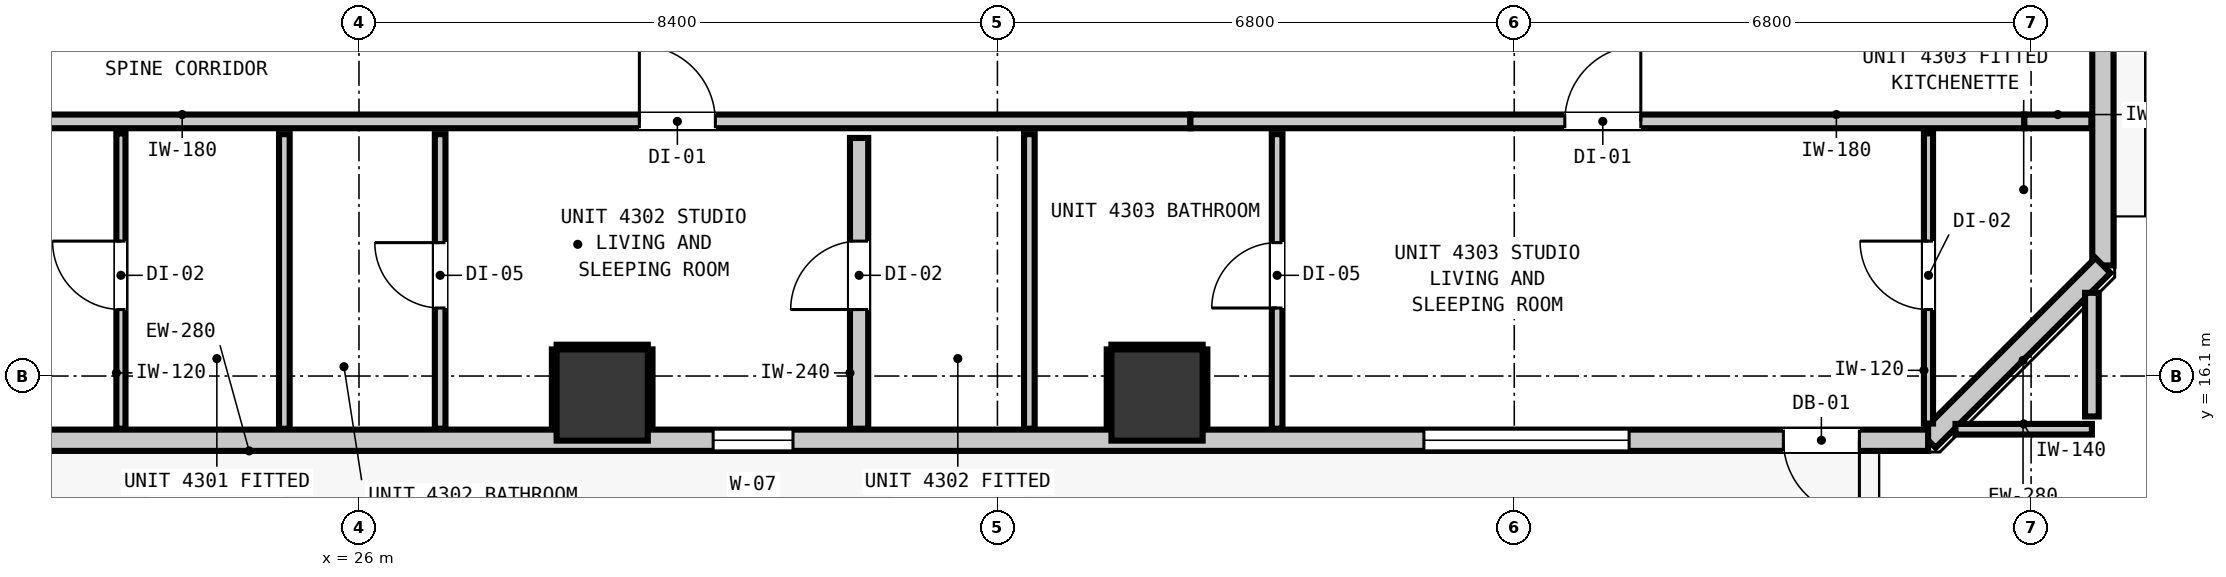
"""IFC4 building model, lengths in metres.
Left out: names, types, materials, properties, quantities, classifications, styles, units other than length and angle.
Written with IfcOpenShell. Run it as: python <this file> out.ifc"""

import sys

from ifc_helpers import new_model, si_unit, direction, frame, frame_2d, origin, origin_2d, place, context, subcontext, project, spatial, rectangle, extrude, element, fill, save


model = new_model("IFC4")
c1 = context("Model", 3, precision=1e-05, world=origin(), true_north=direction((0.0, 1.0)))
c2 = subcontext(c1, "Body", "Model", "MODEL_VIEW")
j1 = project(units=[si_unit("LENGTHUNIT", "METRE"), si_unit("PLANEANGLEUNIT", "RADIAN")], contexts=[c1])
p1 = place(None, origin())
s1 = spatial("IfcSite", under=j1, at=p1, CompositionType="ELEMENT")
p2 = place(p1, origin())
s2 = spatial("IfcBuilding", under=s1, at=p2, CompositionType="ELEMENT")
p3 = place(p2, frame((0.0, 0.0, 149.24)))
s3 = spatial("IfcBuildingStorey", under=s2, at=p3, CompositionType="ELEMENT", Elevation=149.24)
for number, where, z_axis, x_axis in (
    (1, (29.2, 15.85, 0.0), (0.0, 0.0, 1.0), (1.0, 0.0, 0.0)),
    (2, (36.5, 15.85, 0.0), (0.0, 0.0, 1.0), (1.0, 0.0, 0.0)),
):
    element("IfcColumn", number, at=place(p3, frame(where, z_axis=z_axis, x_axis=x_axis)), inside=s3, PredefinedType="COLUMN", context=c2, shape_type="SweptSolid", body=[
        extrude(rectangle(XDim=1.2, YDim=1.2, at=origin_2d()), origin(), (0.0, 0.0, 1.0), 3.32),
    ])
p4 = place(p3, frame((48.945, 49.845, 0.0), z_axis=(0.0, 0.0, 1.0), x_axis=(0.0, -1.0, 0.0)))
e3 = element("IfcWall", 3, at=p4, inside=s3, PredefinedType="STANDARD", context=c2, shape_type="SweptSolid", body=[
    extrude(rectangle(XDim=32.29, YDim=0.28, at=frame_2d((16.145, 0.0))), origin(), (0.0, 0.0, 1.0), 3.08),
])
p5 = place(p4, frame((0.904, 0.0, 0.0)))
e4 = element("IfcOpeningElement", 4, at=p5, cuts=e3, PredefinedType="OPENING", context=c2, shape_type="SweptSolid", body=[
    extrude(rectangle(XDim=1.0, YDim=2.15, at=frame_2d((0.5, 1.075))), frame((0.0, 0.15, 0.0), z_axis=(0.0, -1.0, 0.0), x_axis=(1.0, 0.0, 0.0)), (0.0, 0.0, 1.0), 0.3),
])
p6 = place(p4, frame((3.074, 0.0, 0.85)))
e5 = element("IfcOpeningElement", 5, at=p6, cuts=e3, PredefinedType="OPENING", context=c2, shape_type="SweptSolid", body=[
    extrude(rectangle(XDim=1.05, YDim=1.65, at=frame_2d((0.525, 0.825))), frame((0.0, 0.15, 0.0), z_axis=(0.0, -1.0, 0.0), x_axis=(1.0, 0.0, 0.0)), (0.0, 0.0, 1.0), 0.3),
])
p7 = place(p4, frame((23.057, 0.0, 0.85)))
e6 = element("IfcOpeningElement", 6, at=p7, cuts=e3, PredefinedType="OPENING", context=c2, shape_type="SweptSolid", body=[
    extrude(rectangle(XDim=2.7, YDim=2.0, at=frame_2d((1.35, 1.0))), frame((0.0, 0.15, 0.0), z_axis=(0.0, -1.0, 0.0), x_axis=(1.0, 0.0, 0.0)), (0.0, 0.0, 1.0), 0.3),
])
p8 = place(p4, frame((20.733, 0.0, 0.85)))
e7 = element("IfcOpeningElement", 7, at=p8, cuts=e3, PredefinedType="OPENING", context=c2, shape_type="SweptSolid", body=[
    extrude(rectangle(XDim=1.05, YDim=1.65, at=frame_2d((0.525, 0.825))), frame((0.0, 0.15, 0.0), z_axis=(0.0, -1.0, 0.0), x_axis=(1.0, 0.0, 0.0)), (0.0, 0.0, 1.0), 0.3),
])
p9 = place(p4, frame((13.523, 0.0, 0.85)))
e8 = element("IfcOpeningElement", 8, at=p9, cuts=e3, PredefinedType="OPENING", context=c2, shape_type="SweptSolid", body=[
    extrude(rectangle(XDim=2.7, YDim=2.0, at=frame_2d((1.35, 1.0))), frame((0.0, 0.15, 0.0), z_axis=(0.0, -1.0, 0.0), x_axis=(1.0, 0.0, 0.0)), (0.0, 0.0, 1.0), 0.3),
])
p10 = place(p4, frame((11.247, 0.0, 0.85)))
e9 = element("IfcOpeningElement", 9, at=p10, cuts=e3, PredefinedType="OPENING", context=c2, shape_type="SweptSolid", body=[
    extrude(rectangle(XDim=1.05, YDim=1.65, at=frame_2d((0.525, 0.825))), frame((0.0, 0.15, 0.0), z_axis=(0.0, -1.0, 0.0), x_axis=(1.0, 0.0, 0.0)), (0.0, 0.0, 1.0), 0.3),
])
p11 = place(p3, frame((48.945, 17.555, 0.0), z_axis=(0.0, 0.0, 1.0), x_axis=(-0.707106781187, -0.707106781187, 0.0)))
e10 = element("IfcWall", 10, at=p11, inside=s3, PredefinedType="STANDARD", context=c2, shape_type="SweptSolid", body=[
    extrude(rectangle(XDim=3.253, YDim=0.28, at=frame_2d((1.626, 0.0))), origin(), (0.0, 0.0, 1.0), 3.08),
])
p12 = place(p3, frame((46.645, 15.255, 0.0), z_axis=(0.0, 0.0, 1.0), x_axis=(-1.0, 0.0, 0.0)))
e11 = element("IfcWall", 11, at=p12, inside=s3, PredefinedType="STANDARD", context=c2, shape_type="SweptSolid", body=[
    extrude(rectangle(XDim=35.09, YDim=0.28, at=frame_2d((17.545, 0.0))), origin(), (0.0, 0.0, 1.0), 3.08),
])
p13 = place(p12, frame((0.904, 0.0, 0.0)))
e12 = element("IfcOpeningElement", 12, at=p13, cuts=e11, PredefinedType="OPENING", context=c2, shape_type="SweptSolid", body=[
    extrude(rectangle(XDim=1.0, YDim=2.15, at=frame_2d((0.5, 1.075))), frame((0.0, 0.15, 0.0), z_axis=(0.0, -1.0, 0.0), x_axis=(1.0, 0.0, 0.0)), (0.0, 0.0, 1.0), 0.3),
])
p14 = place(p12, frame((28.195, 0.0, 0.85)))
e13 = element("IfcOpeningElement", 13, at=p14, cuts=e11, PredefinedType="OPENING", context=c2, shape_type="SweptSolid", body=[
    extrude(rectangle(XDim=2.7, YDim=2.0, at=frame_2d((1.35, 1.0))), frame((0.0, 0.15, 0.0), z_axis=(0.0, -1.0, 0.0), x_axis=(1.0, 0.0, 0.0)), (0.0, 0.0, 1.0), 0.3),
])
p15 = place(p12, frame((14.935, 0.0, 0.85)))
e14 = element("IfcOpeningElement", 14, at=p15, cuts=e11, PredefinedType="OPENING", context=c2, shape_type="SweptSolid", body=[
    extrude(rectangle(XDim=1.05, YDim=1.65, at=frame_2d((0.525, 0.825))), frame((0.0, 0.15, 0.0), z_axis=(0.0, -1.0, 0.0), x_axis=(1.0, 0.0, 0.0)), (0.0, 0.0, 1.0), 0.3),
])
p16 = place(p12, frame((3.934, 0.0, 0.85)))
e15 = element("IfcOpeningElement", 15, at=p16, cuts=e11, PredefinedType="OPENING", context=c2, shape_type="SweptSolid", body=[
    extrude(rectangle(XDim=2.7, YDim=2.0, at=frame_2d((1.35, 1.0))), frame((0.0, 0.15, 0.0), z_axis=(0.0, -1.0, 0.0), x_axis=(1.0, 0.0, 0.0)), (0.0, 0.0, 1.0), 0.3),
])
p17 = place(p3, frame((9.407, 19.45, 0.0), z_axis=(0.0, 0.0, 1.0), x_axis=(1.0, 0.0, 0.0)))
e16 = element("IfcWall", 16, at=p17, inside=s3, PredefinedType="PARTITIONING", context=c2, shape_type="SweptSolid", body=[
    extrude(rectangle(XDim=27.532, YDim=0.18, at=frame_2d((13.766, 0.0))), origin(), (0.0, 0.0, 1.0), 3.08),
])
p18 = place(p17, frame((7.252, 0.0, 0.0)))
e17 = element("IfcOpeningElement", 17, at=p18, cuts=e16, PredefinedType="OPENING", context=c2, shape_type="SweptSolid", body=[
    extrude(rectangle(XDim=1.0, YDim=2.15, at=frame_2d((0.5, 1.075))), frame((0.0, 0.1, 0.0), z_axis=(0.0, -1.0, 0.0), x_axis=(1.0, 0.0, 0.0)), (0.0, 0.0, 1.0), 0.2),
])
p19 = place(p17, frame((20.282, 0.0, 0.0)))
e18 = element("IfcOpeningElement", 18, at=p19, cuts=e16, PredefinedType="OPENING", context=c2, shape_type="SweptSolid", body=[
    extrude(rectangle(XDim=1.0, YDim=2.15, at=frame_2d((0.5, 1.075))), frame((0.0, 0.1, 0.0), z_axis=(0.0, -1.0, 0.0), x_axis=(1.0, 0.0, 0.0)), (0.0, 0.0, 1.0), 0.2),
])
p20 = place(p3, frame((36.939, 19.45, 0.0), z_axis=(0.0, 0.0, 1.0), x_axis=(1.0, 0.0, 0.0)))
e19 = element("IfcWall", 19, at=p20, inside=s3, PredefinedType="PARTITIONING", context=c2, shape_type="SweptSolid", body=[
    extrude(rectangle(XDim=10.972, YDim=0.18, at=frame_2d((5.486, 0.0))), origin(), (0.0, 0.0, 1.0), 2.565),
])
p21 = place(p20, frame((4.926, 0.0, 0.0)))
e20 = element("IfcOpeningElement", 20, at=p21, cuts=e19, PredefinedType="OPENING", context=c2, shape_type="SweptSolid", body=[
    extrude(rectangle(XDim=1.0, YDim=2.15, at=frame_2d((0.5, 1.075))), frame((0.0, 0.1, 0.0), z_axis=(0.0, -1.0, 0.0), x_axis=(1.0, 0.0, 0.0)), (0.0, 0.0, 1.0), 0.2),
])
p22 = place(p3, frame((47.911, 19.45, 0.0), z_axis=(0.0, 0.0, 1.0), x_axis=(1.0, 0.0, 0.0)))
e21 = element("IfcWall", 21, at=p22, inside=s3, PredefinedType="PARTITIONING", context=c2, shape_type="SweptSolid", body=[
    extrude(rectangle(XDim=0.882, YDim=0.18, at=frame_2d((0.441, 0.0))), origin(), (0.0, 0.0, 1.0), 3.08),
])
p23 = place(p3, frame((47.005, 15.4, 0.0), z_axis=(0.0, 0.0, 1.0), x_axis=(1.0, 0.0, 0.0)))
e22 = element("IfcWall", 22, at=p23, inside=s3, PredefinedType="PARTITIONING", context=c2, shape_type="SweptSolid", body=[
    extrude(rectangle(XDim=1.795, YDim=0.14, at=frame_2d((0.897, 0.0))), origin(), (0.0, 0.0, 1.0), 3.08),
])
p24 = place(p3, frame((32.58, 15.407, 0.0), z_axis=(0.0, 0.0, 1.0), x_axis=(0.0, 1.0, 0.0)))
e23 = element("IfcWall", 23, at=p24, inside=s3, PredefinedType="PARTITIONING", context=c2, shape_type="SweptSolid", body=[
    extrude(rectangle(XDim=3.825, YDim=0.24, at=frame_2d((1.913, 0.0))), origin(), (0.0, 0.0, 1.0), 3.08),
])
p25 = place(p24, frame((1.568, 0.0, 0.0)))
e24 = element("IfcOpeningElement", 24, at=p25, cuts=e23, PredefinedType="OPENING", context=c2, shape_type="SweptSolid", body=[
    extrude(rectangle(XDim=0.9, YDim=2.1, at=frame_2d((0.45, 1.05))), frame((0.0, 0.13, 0.0), z_axis=(0.0, -1.0, 0.0), x_axis=(1.0, 0.0, 0.0)), (0.0, 0.0, 1.0), 0.26),
])
p26 = place(p3, frame((48.8, 15.568, 0.0), z_axis=(0.0, 0.0, 1.0), x_axis=(0.0, 1.0, 0.0)))
e25 = element("IfcWall", 25, at=p26, inside=s3, PredefinedType="PARTITIONING", context=c2, shape_type="SweptSolid", body=[
    extrude(rectangle(XDim=1.627, YDim=0.18, at=frame_2d((0.813, 0.0))), origin(), (0.0, 0.0, 1.0), 3.08),
])
p27 = place(p3, frame((25.018, 15.407, 0.0), z_axis=(0.0, 0.0, 1.0), x_axis=(0.0, 1.0, 0.0)))
e26 = element("IfcWall", 26, at=p27, inside=s3, PredefinedType="PARTITIONING", context=c2, shape_type="SweptSolid", body=[
    extrude(rectangle(XDim=3.875, YDim=0.14, at=frame_2d((1.938, 0.0))), origin(), (0.0, 0.0, 1.0), 3.08),
])
p28 = place(p3, frame((27.068, 15.407, 0.0), z_axis=(0.0, 0.0, 1.0), x_axis=(0.0, 1.0, 0.0)))
e27 = element("IfcWall", 27, at=p28, inside=s3, PredefinedType="PARTITIONING", context=c2, shape_type="SweptSolid", body=[
    extrude(rectangle(XDim=3.875, YDim=0.14, at=frame_2d((1.938, 0.0))), origin(), (0.0, 0.0, 1.0), 3.08),
])
p29 = place(p28, frame((1.588, 0.0, 0.0)))
e28 = element("IfcOpeningElement", 28, at=p29, cuts=e27, PredefinedType="OPENING", context=c2, shape_type="SweptSolid", body=[
    extrude(rectangle(XDim=0.86, YDim=2.02, at=frame_2d((0.43, 1.01))), frame((0.0, 0.08, 0.0), z_axis=(0.0, -1.0, 0.0), x_axis=(1.0, 0.0, 0.0)), (0.0, 0.0, 1.0), 0.16),
])
p30 = place(p3, frame((34.82, 15.407, 0.0), z_axis=(0.0, 0.0, 1.0), x_axis=(0.0, 1.0, 0.0)))
e29 = element("IfcWall", 29, at=p30, inside=s3, PredefinedType="PARTITIONING", context=c2, shape_type="SweptSolid", body=[
    extrude(rectangle(XDim=3.875, YDim=0.14, at=frame_2d((1.938, 0.0))), origin(), (0.0, 0.0, 1.0), 3.08),
])
p31 = place(p3, frame((38.08, 15.407, 0.0), z_axis=(0.0, 0.0, 1.0), x_axis=(0.0, 1.0, 0.0)))
e30 = element("IfcWall", 30, at=p31, inside=s3, PredefinedType="PARTITIONING", context=c2, shape_type="SweptSolid", body=[
    extrude(rectangle(XDim=3.875, YDim=0.14, at=frame_2d((1.938, 0.0))), origin(), (0.0, 0.0, 1.0), 3.08),
])
p32 = place(p31, frame((1.588, 0.0, 0.0)))
e31 = element("IfcOpeningElement", 31, at=p32, cuts=e30, PredefinedType="OPENING", context=c2, shape_type="SweptSolid", body=[
    extrude(rectangle(XDim=0.86, YDim=2.02, at=frame_2d((0.43, 1.01))), frame((0.0, 0.08, 0.0), z_axis=(0.0, -1.0, 0.0), x_axis=(1.0, 0.0, 0.0)), (0.0, 0.0, 1.0), 0.16),
])
p33 = place(p3, frame((22.868, 15.407, 0.0), z_axis=(0.0, 0.0, 1.0), x_axis=(0.0, 1.0, 0.0)))
e32 = element("IfcWall", 32, at=p33, inside=s3, PredefinedType="PARTITIONING", context=c2, shape_type="SweptSolid", body=[
    extrude(rectangle(XDim=3.885, YDim=0.12, at=frame_2d((1.942, 0.0))), origin(), (0.0, 0.0, 1.0), 3.08),
])
p34 = place(p33, frame((1.568, 0.0, 0.0)))
e33 = element("IfcOpeningElement", 33, at=p34, cuts=e32, PredefinedType="OPENING", context=c2, shape_type="SweptSolid", body=[
    extrude(rectangle(XDim=0.9, YDim=2.1, at=frame_2d((0.45, 1.05))), frame((0.0, 0.07, 0.0), z_axis=(0.0, -1.0, 0.0), x_axis=(1.0, 0.0, 0.0)), (0.0, 0.0, 1.0), 0.14),
])
p35 = place(p3, frame((46.65, 15.475, 0.0), z_axis=(0.0, 0.0, 1.0), x_axis=(0.0, 1.0, 0.0)))
e34 = element("IfcWall", 34, at=p35, inside=s3, PredefinedType="PARTITIONING", context=c2, shape_type="SweptSolid", body=[
    extrude(rectangle(XDim=3.817, YDim=0.12, at=frame_2d((1.908, 0.0))), origin(), (0.0, 0.0, 1.0), 3.08),
])
p36 = place(p35, frame((1.5, 0.0, 0.0)))
e35 = element("IfcOpeningElement", 35, at=p36, cuts=e34, PredefinedType="OPENING", context=c2, shape_type="SweptSolid", body=[
    extrude(rectangle(XDim=0.9, YDim=2.1, at=frame_2d((0.45, 1.05))), frame((0.0, 0.07, 0.0), z_axis=(0.0, -1.0, 0.0), x_axis=(1.0, 0.0, 0.0)), (0.0, 0.0, 1.0), 0.14),
])
p37 = place(p3, frame((28.6, 16.482, 0.0), z_axis=(0.0, 0.0, 1.0), x_axis=(1.0, 0.0, 0.0)))
e36 = element("IfcWall", 36, at=p37, inside=s3, PredefinedType="PARTITIONING", context=c2, shape_type="SweptSolid", body=[
    extrude(rectangle(XDim=1.2, YDim=0.06, at=frame_2d((0.6, 0.0))), origin(), (0.0, 0.0, 1.0), 1.45),
])
for number, where, z_axis, x_axis in (
    (37, (28.568, 15.41, 0.0), (0.0, 0.0, 1.0), (0.0, 1.0, 0.0)),
    (38, (29.832, 15.41, 0.0), (0.0, 0.0, 1.0), (0.0, 1.0, 0.0)),
):
    element("IfcWall", number, at=place(p3, frame(where, z_axis=z_axis, x_axis=x_axis)), inside=s3, PredefinedType="PARTITIONING", context=c2, shape_type="SweptSolid", body=[
        extrude(rectangle(XDim=1.04, YDim=0.06, at=frame_2d((0.52, 0.0))), origin(), (0.0, 0.0, 1.0), 1.45),
    ])
p38 = place(p3, frame((35.9, 16.482, 0.0), z_axis=(0.0, 0.0, 1.0), x_axis=(1.0, 0.0, 0.0)))
e39 = element("IfcWall", 39, at=p38, inside=s3, PredefinedType="PARTITIONING", context=c2, shape_type="SweptSolid", body=[
    extrude(rectangle(XDim=1.2, YDim=0.06, at=frame_2d((0.6, 0.0))), origin(), (0.0, 0.0, 1.0), 1.45),
])
for number, where, z_axis, x_axis in (
    (40, (35.868, 15.41, 0.0), (0.0, 0.0, 1.0), (0.0, 1.0, 0.0)),
    (41, (37.132, 15.41, 0.0), (0.0, 0.0, 1.0), (0.0, 1.0, 0.0)),
):
    element("IfcWall", number, at=place(p3, frame(where, z_axis=z_axis, x_axis=x_axis)), inside=s3, PredefinedType="PARTITIONING", context=c2, shape_type="SweptSolid", body=[
        extrude(rectangle(XDim=1.04, YDim=0.06, at=frame_2d((0.52, 0.0))), origin(), (0.0, 0.0, 1.0), 1.45),
    ])
p39 = place(p13, origin())
e42 = element("IfcDoor", 42, at=p39, inside=s3, OperationType="SINGLE_SWING_LEFT", PredefinedType="DOOR", context=c2, shape_type="SweptSolid", body=[
    extrude(rectangle(XDim=1.0, YDim=2.15, at=frame_2d((0.5, 1.075))), frame((0.0, 0.025, 0.0), z_axis=(0.0, -1.0, 0.0), x_axis=(1.0, 0.0, 0.0)), (0.0, 0.0, 1.0), 0.05),
])
fill(e12, e42)
p40 = place(p15, origin())
e43 = element("IfcWindow", 43, at=p40, inside=s3, PartitioningType="SINGLE_PANEL", PredefinedType="WINDOW", context=c2, shape_type="SweptSolid", body=[
    extrude(rectangle(XDim=1.05, YDim=1.65, at=frame_2d((0.525, 0.825))), frame((0.0, 0.03, 0.0), z_axis=(0.0, -1.0, 0.0), x_axis=(1.0, 0.0, 0.0)), (0.0, 0.0, 1.0), 0.06),
])
fill(e14, e43)
p41 = place(p16, origin())
e44 = element("IfcWindow", 44, at=p41, inside=s3, PartitioningType="SINGLE_PANEL", PredefinedType="WINDOW", context=c2, shape_type="SweptSolid", body=[
    extrude(rectangle(XDim=2.7, YDim=2.0, at=frame_2d((1.35, 1.0))), frame((0.0, 0.03, 0.0), z_axis=(0.0, -1.0, 0.0), x_axis=(1.0, 0.0, 0.0)), (0.0, 0.0, 1.0), 0.06),
])
fill(e15, e44)
p42 = place(p34, origin())
e45 = element("IfcDoor", 45, at=p42, inside=s3, OperationType="SINGLE_SWING_RIGHT", PredefinedType="DOOR", context=c2, shape_type="SweptSolid", body=[
    extrude(rectangle(XDim=0.9, YDim=2.1, at=frame_2d((0.45, 1.05))), frame((0.0, 0.025, 0.0), z_axis=(0.0, -1.0, 0.0), x_axis=(1.0, 0.0, 0.0)), (0.0, 0.0, 1.0), 0.05),
])
fill(e33, e45)
p43 = place(p19, origin())
e46 = element("IfcDoor", 46, at=p43, inside=s3, OperationType="SINGLE_SWING_LEFT", PredefinedType="DOOR", context=c2, shape_type="SweptSolid", body=[
    extrude(rectangle(XDim=1.0, YDim=2.15, at=frame_2d((0.5, 1.075))), frame((0.0, 0.025, 0.0), z_axis=(0.0, -1.0, 0.0), x_axis=(1.0, 0.0, 0.0)), (0.0, 0.0, 1.0), 0.05),
])
fill(e18, e46)
p44 = place(p29, origin())
e47 = element("IfcDoor", 47, at=p44, inside=s3, OperationType="SINGLE_SWING_RIGHT", PredefinedType="DOOR", context=c2, shape_type="SweptSolid", body=[
    extrude(rectangle(XDim=0.86, YDim=2.02, at=frame_2d((0.43, 1.01))), frame((0.0, 0.025, 0.0), z_axis=(0.0, -1.0, 0.0), x_axis=(1.0, 0.0, 0.0)), (0.0, 0.0, 1.0), 0.05),
])
fill(e28, e47)
p45 = place(p25, origin())
e48 = element("IfcDoor", 48, at=p45, inside=s3, OperationType="SINGLE_SWING_LEFT", PredefinedType="DOOR", context=c2, shape_type="SweptSolid", body=[
    extrude(rectangle(XDim=0.9, YDim=2.1, at=frame_2d((0.45, 1.05))), frame((0.0, 0.025, 0.0), z_axis=(0.0, -1.0, 0.0), x_axis=(1.0, 0.0, 0.0)), (0.0, 0.0, 1.0), 0.05),
])
fill(e24, e48)
p46 = place(p21, origin())
e49 = element("IfcDoor", 49, at=p46, inside=s3, OperationType="SINGLE_SWING_RIGHT", PredefinedType="DOOR", context=c2, shape_type="SweptSolid", body=[
    extrude(rectangle(XDim=1.0, YDim=2.15, at=frame_2d((0.5, 1.075))), frame((0.0, 0.025, 0.0), z_axis=(0.0, -1.0, 0.0), x_axis=(1.0, 0.0, 0.0)), (0.0, 0.0, 1.0), 0.05),
])
fill(e20, e49)
p47 = place(p32, origin())
e50 = element("IfcDoor", 50, at=p47, inside=s3, OperationType="SINGLE_SWING_LEFT", PredefinedType="DOOR", context=c2, shape_type="SweptSolid", body=[
    extrude(rectangle(XDim=0.86, YDim=2.02, at=frame_2d((0.43, 1.01))), frame((0.0, 0.025, 0.0), z_axis=(0.0, -1.0, 0.0), x_axis=(1.0, 0.0, 0.0)), (0.0, 0.0, 1.0), 0.05),
])
fill(e31, e50)
p48 = place(p36, origin())
e51 = element("IfcDoor", 51, at=p48, inside=s3, OperationType="SINGLE_SWING_RIGHT", PredefinedType="DOOR", context=c2, shape_type="SweptSolid", body=[
    extrude(rectangle(XDim=0.9, YDim=2.1, at=frame_2d((0.45, 1.05))), frame((0.0, 0.025, 0.0), z_axis=(0.0, -1.0, 0.0), x_axis=(1.0, 0.0, 0.0)), (0.0, 0.0, 1.0), 0.05),
])
fill(e35, e51)
save(model, sys.argv[1])
